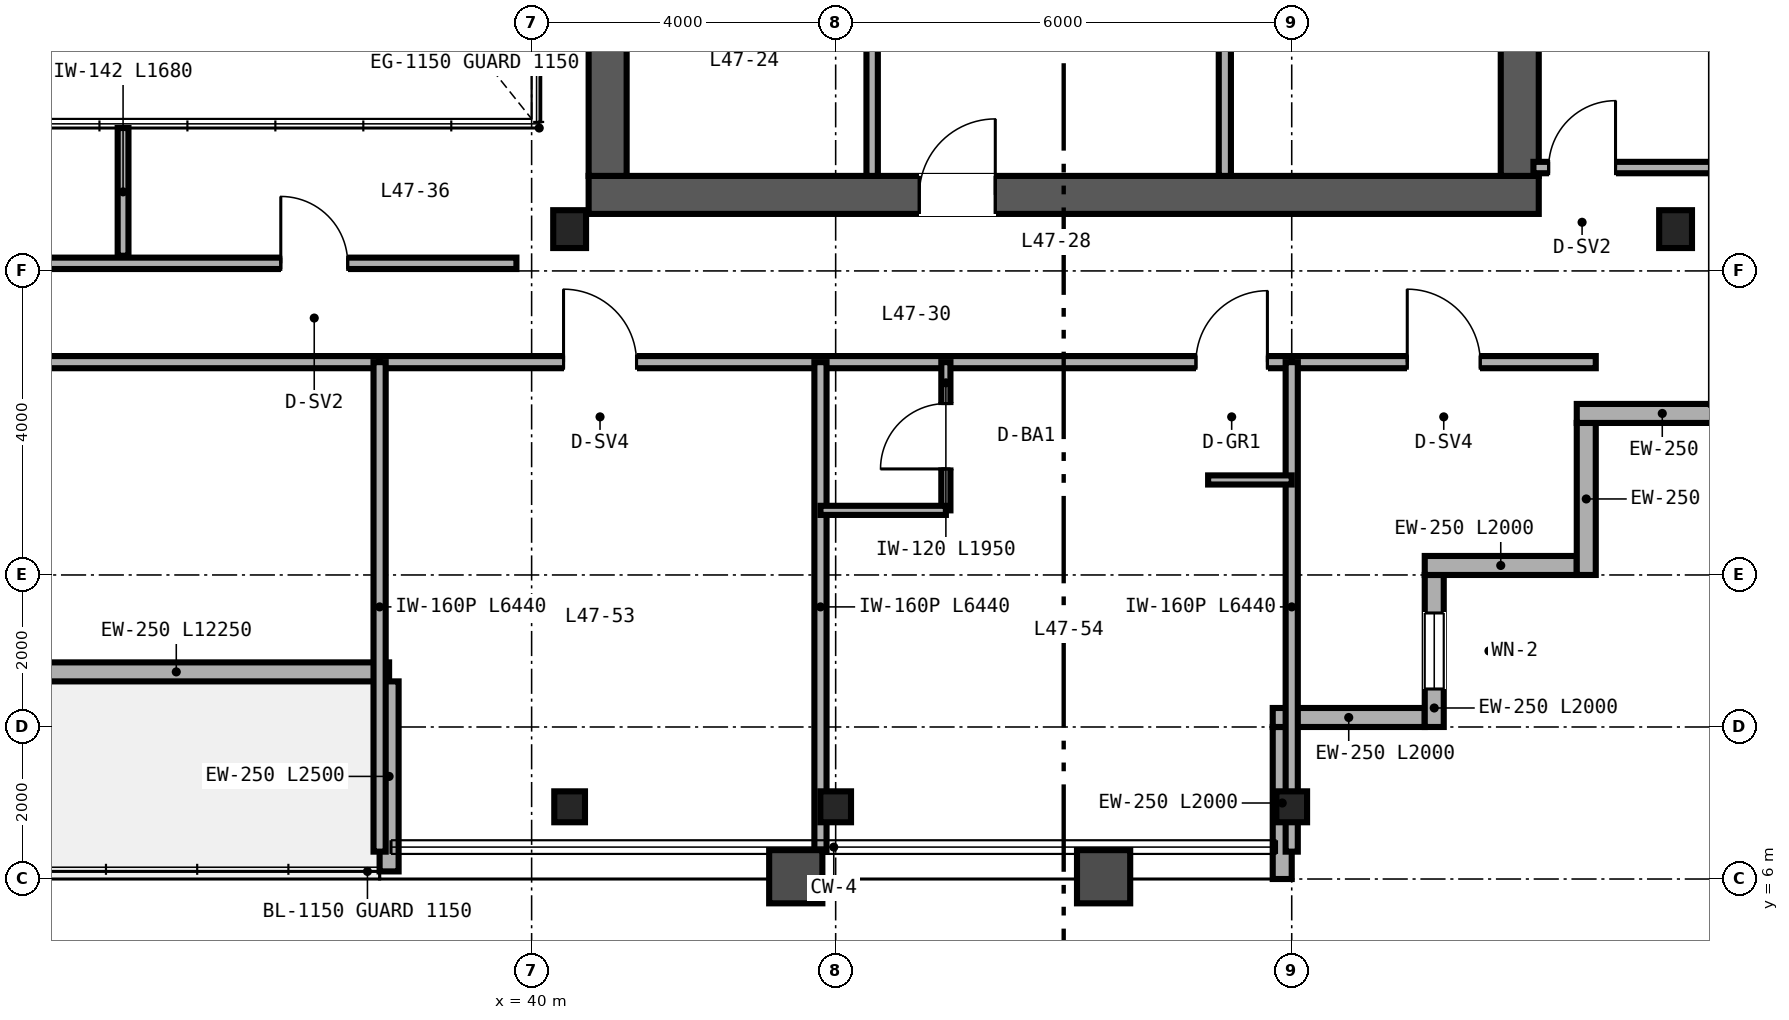
"""IFC4 building model, lengths in metres.
Left out: names, types, materials, properties, quantities, classifications, styles, units other than length and angle.
Written with IfcOpenShell. Run it as: python <this file> out.ifc"""

import sys

from ifc_helpers import new_model, si_unit, direction, frame, frame_2d, origin, origin_2d, place, context, subcontext, project, spatial, rectangle, i_section, extrude, source, transform, mapped, element, fill, save


model = new_model("IFC4")
c1 = context("Model", 3, precision=1e-05, world=origin(), true_north=direction((0.0, 1.0)))
c2 = subcontext(c1, "Body", "Model", "MODEL_VIEW")
j1 = project(units=[si_unit("LENGTHUNIT", "METRE"), si_unit("PLANEANGLEUNIT", "RADIAN")], contexts=[c1])
p1 = place(None, origin())
s1 = spatial("IfcSite", under=j1, at=p1, CompositionType="ELEMENT")
p2 = place(p1, origin())
s2 = spatial("IfcBuilding", under=s1, at=p2, CompositionType="ELEMENT")
p3 = place(p2, frame((0.0, 0.0, 188.4)))
s3 = spatial("IfcBuildingStorey", under=s2, at=p3, CompositionType="ELEMENT", Elevation=188.4)
p4 = place(p3, frame((40.75, 15.0, 0.0), z_axis=(0.0, 0.0, 1.0), x_axis=(1.0, 0.0, 0.0)))
e1 = element("IfcWall", 1, at=p4, inside=s3, PredefinedType="SHEAR", context=c2, shape_type="SweptSolid", body=[
    extrude(rectangle(XDim=12.5, YDim=0.5, at=frame_2d((6.25, 0.0))), origin(), (0.0, 0.0, 1.0), 3.37),
])
p5 = place(p4, frame((4.35, 0.0, 0.0)))
e2 = element("IfcOpeningElement", 2, at=p5, cuts=e1, PredefinedType="OPENING", context=c2, shape_type="SweptSolid", body=[
    extrude(rectangle(XDim=1.0, YDim=2.15, at=frame_2d((0.5, 1.075))), frame((0.0, 0.26, 0.0), z_axis=(0.0, -1.0, 0.0), x_axis=(1.0, 0.0, 0.0)), (0.0, 0.0, 1.0), 0.52),
])
for number, where, z_axis, x_axis in (
    (3, (41.0, 15.25, 0.0), (0.0, 0.0, 1.0), (0.0, 1.0, 0.0)),
    (4, (53.0, 15.25, 0.0), (0.0, 0.0, 1.0), (0.0, 1.0, 0.0)),
):
    element("IfcWall", number, at=place(p3, frame(where, z_axis=z_axis, x_axis=x_axis)), inside=s3, PredefinedType="SHEAR", context=c2, shape_type="SweptSolid", body=[
        extrude(rectangle(XDim=21.5, YDim=0.5, at=frame_2d((10.75, 0.0))), origin(), (0.0, 0.0, 1.0), 3.37),
    ])
m1 = source(origin(), c2, "Body", "SweptSolid", [
    extrude(i_section(OverallWidth=0.432, OverallDepth=0.498, WebThickness=0.056, FlangeThickness=0.089, FilletRadius=0.025, at=origin_2d()), origin(), (0.0, 0.0, 1.0), 3.37),
])
for number, where, z_axis, x_axis in (
    (5, (40.5, 14.55, 0.0), (0.0, 0.0, 1.0), (1.0, 0.0, 0.0)),
    (6, (55.05, 14.55, 0.0), (0.0, 0.0, 1.0), (1.0, 0.0, 0.0)),
):
    element("IfcColumn", number, at=place(p3, frame(where, z_axis=z_axis, x_axis=x_axis)), inside=s3, PredefinedType="COLUMN", context=c2, shape_type="MappedRepresentation", body=[
        mapped(m1, transform((0.0, 0.0, 0.0), scale=1.0)),
    ])
m2 = source(origin(), c2, "Body", "SweptSolid", [
    extrude(i_section(OverallWidth=0.404, OverallDepth=0.407, WebThickness=0.027, FlangeThickness=0.044, FilletRadius=0.025, at=origin_2d()), origin(), (0.0, 0.0, 1.0), 3.37),
])
for number, where, z_axis, x_axis in (
    (7, (40.5, 6.95, 0.0), (0.0, 0.0, 1.0), (1.0, 0.0, 0.0)),
    (8, (44.0, 6.95, 0.0), (0.0, 0.0, 1.0), (1.0, 0.0, 0.0)),
    (9, (50.0, 6.95, 0.0), (0.0, 0.0, 1.0), (1.0, 0.0, 0.0)),
):
    element("IfcColumn", number, at=place(p3, frame(where, z_axis=z_axis, x_axis=x_axis)), inside=s3, PredefinedType="COLUMN", context=c2, shape_type="MappedRepresentation", body=[
        mapped(m2, transform((0.0, 0.0, 0.0), scale=1.0)),
    ])
p6 = place(p3, frame((49.875, 6.0, 0.0), z_axis=(0.0, 0.0, 1.0), x_axis=(0.0, 1.0, 0.0)))
e10 = element("IfcWall", 10, at=p6, inside=s3, PredefinedType="SOLIDWALL", context=c2, shape_type="SweptSolid", body=[
    extrude(rectangle(XDim=2.0, YDim=0.25, at=frame_2d((1.0, 0.0))), origin(), (0.0, 0.0, 1.0), 2.677),
])
p7 = place(p3, frame((49.75, 8.125, 0.0), z_axis=(0.0, 0.0, 1.0), x_axis=(1.0, 0.0, 0.0)))
e11 = element("IfcWall", 11, at=p7, inside=s3, PredefinedType="SOLIDWALL", context=c2, shape_type="SweptSolid", body=[
    extrude(rectangle(XDim=2.0, YDim=0.25, at=frame_2d((1.0, 0.0))), origin(), (0.0, 0.0, 1.0), 3.37),
])
p8 = place(p3, frame((51.875, 8.0, 0.0), z_axis=(0.0, 0.0, 1.0), x_axis=(0.0, 1.0, 0.0)))
e12 = element("IfcWall", 12, at=p8, inside=s3, PredefinedType="SOLIDWALL", context=c2, shape_type="SweptSolid", body=[
    extrude(rectangle(XDim=2.0, YDim=0.25, at=frame_2d((1.0, 0.0))), origin(), (0.0, 0.0, 1.0), 3.37),
])
p9 = place(p8, frame((0.5, 0.0, 0.85)))
e13 = element("IfcOpeningElement", 13, at=p9, cuts=e12, PredefinedType="OPENING", context=c2, shape_type="SweptSolid", body=[
    extrude(rectangle(XDim=1.0, YDim=1.9, at=frame_2d((0.5, 0.95))), frame((0.0, 0.135, 0.0), z_axis=(0.0, -1.0, 0.0), x_axis=(1.0, 0.0, 0.0)), (0.0, 0.0, 1.0), 0.27),
])
for number, where, z_axis, x_axis in (
    (14, (51.75, 10.125, 0.0), (0.0, 0.0, 1.0), (1.0, 0.0, 0.0)),
    (15, (53.875, 10.0, 0.0), (0.0, 0.0, 1.0), (0.0, 1.0, 0.0)),
):
    element("IfcWall", number, at=place(p3, frame(where, z_axis=z_axis, x_axis=x_axis)), inside=s3, PredefinedType="SOLIDWALL", context=c2, shape_type="SweptSolid", body=[
        extrude(rectangle(XDim=2.0, YDim=0.25, at=frame_2d((1.0, 0.0))), origin(), (0.0, 0.0, 1.0), 3.37),
    ])
p10 = place(p3, frame((53.75, 12.125, 0.0), z_axis=(0.0, 0.0, 1.0), x_axis=(1.0, 0.0, 0.0)))
e16 = element("IfcWall", 16, at=p10, inside=s3, PredefinedType="SOLIDWALL", context=c2, shape_type="SweptSolid", body=[
    extrude(rectangle(XDim=2.25, YDim=0.25, at=frame_2d((1.125, 0.0))), origin(), (0.0, 0.0, 1.0), 3.37),
])
p11 = place(p3, frame((25.875, 8.725, 0.0), z_axis=(0.0, 0.0, 1.0), x_axis=(1.0, 0.0, 0.0)))
e17 = element("IfcWall", 17, at=p11, inside=s3, PredefinedType="SOLIDWALL", context=c2, shape_type="SweptSolid", body=[
    extrude(rectangle(XDim=12.25, YDim=0.25, at=frame_2d((6.125, 0.0))), origin(), (0.0, 0.0, 1.0), 3.37),
])
p12 = place(p11, frame((5.6, 0.0, 0.0)))
e18 = element("IfcOpeningElement", 18, at=p12, cuts=e17, PredefinedType="OPENING", context=c2, shape_type="SweptSolid", body=[
    extrude(rectangle(XDim=1.05, YDim=2.15, at=frame_2d((0.525, 1.075))), frame((0.0, 0.135, 0.0), z_axis=(0.0, -1.0, 0.0), x_axis=(1.0, 0.0, 0.0)), (0.0, 0.0, 1.0), 0.27),
])
p13 = place(p3, frame((38.125, 6.1, 0.0), z_axis=(0.0, 0.0, 1.0), x_axis=(0.0, 1.0, 0.0)))
e19 = element("IfcWall", 19, at=p13, inside=s3, PredefinedType="SOLIDWALL", context=c2, shape_type="SweptSolid", body=[
    extrude(rectangle(XDim=2.5, YDim=0.25, at=frame_2d((1.25, 0.0))), origin(), (0.0, 0.0, 1.0), 2.443),
])
p14 = place(p3, frame((49.12, 15.25, 0.0), z_axis=(0.0, 0.0, 1.0), x_axis=(0.0, 1.0, 0.0)))
e20 = element("IfcWall", 20, at=p14, inside=s3, PredefinedType="PARTITIONING", context=c2, shape_type="SweptSolid", body=[
    extrude(rectangle(XDim=16.13, YDim=0.16, at=frame_2d((8.065, 0.0))), origin(), (0.0, 0.0, 1.0), 2.443),
])
p15 = place(p14, frame((2.2, 0.0, 0.0)))
e21 = element("IfcOpeningElement", 21, at=p15, cuts=e20, PredefinedType="OPENING", context=c2, shape_type="SweptSolid", body=[
    extrude(rectangle(XDim=0.9, YDim=2.15, at=frame_2d((0.45, 1.075))), frame((0.0, 0.09, 0.0), z_axis=(0.0, -1.0, 0.0), x_axis=(1.0, 0.0, 0.0)), (0.0, 0.0, 1.0), 0.18),
])
p16 = place(p14, frame((8.2, 0.0, 0.0)))
e22 = element("IfcOpeningElement", 22, at=p16, cuts=e20, PredefinedType="OPENING", context=c2, shape_type="SweptSolid", body=[
    extrude(rectangle(XDim=0.9, YDim=2.15, at=frame_2d((0.45, 1.075))), frame((0.0, 0.09, 0.0), z_axis=(0.0, -1.0, 0.0), x_axis=(1.0, 0.0, 0.0)), (0.0, 0.0, 1.0), 0.18),
])
p17 = place(p14, frame((13.5, 0.0, 0.0)))
e23 = element("IfcOpeningElement", 23, at=p17, cuts=e20, PredefinedType="OPENING", context=c2, shape_type="SweptSolid", body=[
    extrude(rectangle(XDim=0.9, YDim=2.15, at=frame_2d((0.45, 1.075))), frame((0.0, 0.09, 0.0), z_axis=(0.0, -1.0, 0.0), x_axis=(1.0, 0.0, 0.0)), (0.0, 0.0, 1.0), 0.18),
])
p18 = place(p3, frame((44.48, 15.25, 0.0), z_axis=(0.0, 0.0, 1.0), x_axis=(0.0, 1.0, 0.0)))
e24 = element("IfcWall", 24, at=p18, inside=s3, PredefinedType="PARTITIONING", context=c2, shape_type="SweptSolid", body=[
    extrude(rectangle(XDim=11.63, YDim=0.15, at=frame_2d((5.815, 0.0))), origin(), (0.0, 0.0, 1.0), 3.37),
])
p19 = place(p18, frame((2.2, 0.0, 0.0)))
e25 = element("IfcOpeningElement", 25, at=p19, cuts=e24, PredefinedType="OPENING", context=c2, shape_type="SweptSolid", body=[
    extrude(rectangle(XDim=0.9, YDim=2.15, at=frame_2d((0.45, 1.075))), frame((0.0, 0.085, 0.0), z_axis=(0.0, -1.0, 0.0), x_axis=(1.0, 0.0, 0.0)), (0.0, 0.0, 1.0), 0.17),
])
p20 = place(p18, frame((7.87, 0.0, 0.0)))
e26 = element("IfcOpeningElement", 26, at=p20, cuts=e24, PredefinedType="OPENING", context=c2, shape_type="SweptSolid", body=[
    extrude(rectangle(XDim=0.9, YDim=2.15, at=frame_2d((0.45, 1.075))), frame((0.0, 0.085, 0.0), z_axis=(0.0, -1.0, 0.0), x_axis=(1.0, 0.0, 0.0)), (0.0, 0.0, 1.0), 0.17),
])
p21 = place(p3, frame((24.2, 14.1, 0.0), z_axis=(0.0, 0.0, 1.0), x_axis=(1.0, 0.0, 0.0)))
e27 = element("IfcWall", 27, at=p21, inside=s3, PredefinedType="PARTITIONING", context=c2, shape_type="SweptSolid", body=[
    extrude(rectangle(XDim=15.6, YDim=0.15, at=frame_2d((7.8, 0.0))), origin(), (0.0, 0.0, 1.0), 3.37),
])
p22 = place(p21, frame((2.0, 0.0, 0.0)))
e28 = element("IfcOpeningElement", 28, at=p22, cuts=e27, PredefinedType="OPENING", context=c2, shape_type="SweptSolid", body=[
    extrude(rectangle(XDim=0.88, YDim=2.15, at=frame_2d((0.44, 1.075))), frame((0.0, 0.085, 0.0), z_axis=(0.0, -1.0, 0.0), x_axis=(1.0, 0.0, 0.0)), (0.0, 0.0, 1.0), 0.17),
])
p23 = place(p21, frame((7.25, 0.0, 0.0)))
e29 = element("IfcOpeningElement", 29, at=p23, cuts=e27, PredefinedType="OPENING", context=c2, shape_type="SweptSolid", body=[
    extrude(rectangle(XDim=0.88, YDim=2.15, at=frame_2d((0.44, 1.075))), frame((0.0, 0.085, 0.0), z_axis=(0.0, -1.0, 0.0), x_axis=(1.0, 0.0, 0.0)), (0.0, 0.0, 1.0), 0.17),
])
p24 = place(p21, frame((12.5, 0.0, 0.0)))
e30 = element("IfcOpeningElement", 30, at=p24, cuts=e27, PredefinedType="OPENING", context=c2, shape_type="SweptSolid", body=[
    extrude(rectangle(XDim=0.88, YDim=2.15, at=frame_2d((0.44, 1.075))), frame((0.0, 0.085, 0.0), z_axis=(0.0, -1.0, 0.0), x_axis=(1.0, 0.0, 0.0)), (0.0, 0.0, 1.0), 0.17),
])
p25 = place(p3, frame((34.625, 14.2, 0.0), z_axis=(0.0, 0.0, 1.0), x_axis=(0.0, 1.0, 0.0)))
e31 = element("IfcWall", 31, at=p25, inside=s3, PredefinedType="PARTITIONING", context=c2, shape_type="SweptSolid", body=[
    extrude(rectangle(XDim=1.68, YDim=0.142, at=frame_2d((0.84, 0.0))), origin(), (0.0, 0.0, 1.0), 3.37),
])
p26 = place(p3, frame((53.18, 15.36, 0.0), z_axis=(0.0, 0.0, 1.0), x_axis=(1.0, 0.0, 0.0)))
e32 = element("IfcWall", 32, at=p26, inside=s3, PredefinedType="PARTITIONING", context=c2, shape_type="SweptSolid", body=[
    extrude(rectangle(XDim=2.66, YDim=0.15, at=frame_2d((1.33, 0.0))), origin(), (0.0, 0.0, 1.0), 2.591),
])
p27 = place(p26, frame((0.2, 0.0, 0.0)))
e33 = element("IfcOpeningElement", 33, at=p27, cuts=e32, PredefinedType="OPENING", context=c2, shape_type="SweptSolid", body=[
    extrude(rectangle(XDim=0.88, YDim=2.15, at=frame_2d((0.44, 1.075))), frame((0.0, 0.085, 0.0), z_axis=(0.0, -1.0, 0.0), x_axis=(1.0, 0.0, 0.0)), (0.0, 0.0, 1.0), 0.17),
])
p28 = place(p3, frame((50.0, 12.8, 0.0), z_axis=(0.0, 0.0, 1.0), x_axis=(1.0, 0.0, 0.0)))
e34 = element("IfcWall", 34, at=p28, inside=s3, PredefinedType="PARTITIONING", context=c2, shape_type="SweptSolid", body=[
    extrude(rectangle(XDim=4.0, YDim=0.16, at=frame_2d((2.0, 0.0))), origin(), (0.0, 0.0, 1.0), 3.37),
])
p29 = place(p28, frame((1.52, 0.0, 0.0)))
e35 = element("IfcOpeningElement", 35, at=p29, cuts=e34, PredefinedType="OPENING", context=c2, shape_type="SweptSolid", body=[
    extrude(rectangle(XDim=0.96, YDim=2.15, at=frame_2d((0.48, 1.075))), frame((0.0, 0.09, 0.0), z_axis=(0.0, -1.0, 0.0), x_axis=(1.0, 0.0, 0.0)), (0.0, 0.0, 1.0), 0.18),
])
p30 = place(p3, frame((26.0, 12.8, 0.0), z_axis=(0.0, 0.0, 1.0), x_axis=(1.0, 0.0, 0.0)))
e36 = element("IfcWall", 36, at=p30, inside=s3, PredefinedType="PARTITIONING", context=c2, shape_type="SweptSolid", body=[
    extrude(rectangle(XDim=12.0, YDim=0.16, at=frame_2d((6.0, 0.0))), origin(), (0.0, 0.0, 1.0), 3.37),
])
p31 = place(p30, frame((5.2, 0.0, 0.0)))
e37 = element("IfcOpeningElement", 37, at=p31, cuts=e36, PredefinedType="OPENING", context=c2, shape_type="SweptSolid", body=[
    extrude(rectangle(XDim=0.96, YDim=2.15, at=frame_2d((0.48, 1.075))), frame((0.0, 0.09, 0.0), z_axis=(0.0, -1.0, 0.0), x_axis=(1.0, 0.0, 0.0)), (0.0, 0.0, 1.0), 0.18),
])
p32 = place(p3, frame((38.0, 12.8, 0.0), z_axis=(0.0, 0.0, 1.0), x_axis=(1.0, 0.0, 0.0)))
e38 = element("IfcWall", 38, at=p32, inside=s3, PredefinedType="PARTITIONING", context=c2, shape_type="SweptSolid", body=[
    extrude(rectangle(XDim=12.0, YDim=0.16, at=frame_2d((6.0, 0.0))), origin(), (0.0, 0.0, 1.0), 2.913),
])
p33 = place(p32, frame((2.42, 0.0, 0.0)))
e39 = element("IfcOpeningElement", 39, at=p33, cuts=e38, PredefinedType="OPENING", context=c2, shape_type="SweptSolid", body=[
    extrude(rectangle(XDim=0.96, YDim=2.15, at=frame_2d((0.48, 1.075))), frame((0.0, 0.09, 0.0), z_axis=(0.0, -1.0, 0.0), x_axis=(1.0, 0.0, 0.0)), (0.0, 0.0, 1.0), 0.18),
])
p34 = place(p32, frame((10.74, 0.0, 0.0)))
e40 = element("IfcOpeningElement", 40, at=p34, cuts=e38, PredefinedType="OPENING", context=c2, shape_type="SweptSolid", body=[
    extrude(rectangle(XDim=0.94, YDim=2.15, at=frame_2d((0.47, 1.075))), frame((0.0, 0.09, 0.0), z_axis=(0.0, -1.0, 0.0), x_axis=(1.0, 0.0, 0.0)), (0.0, 0.0, 1.0), 0.18),
])
p35 = place(p3, frame((38.0, 6.36, 0.0), z_axis=(0.0, 0.0, 1.0), x_axis=(0.0, 1.0, 0.0)))
e41 = element("IfcWall", 41, at=p35, inside=s3, PredefinedType="PARTITIONING", context=c2, shape_type="SweptSolid", body=[
    extrude(rectangle(XDim=6.44, YDim=0.16, at=frame_2d((3.22, 0.0))), origin(), (0.0, 0.0, 1.0), 2.443),
])
for number, where, z_axis, x_axis in (
    (42, (50.0, 6.36, 0.0), (0.0, 0.0, 1.0), (0.0, 1.0, 0.0)),
    (43, (43.8, 6.36, 0.0), (0.0, 0.0, 1.0), (0.0, 1.0, 0.0)),
):
    element("IfcWall", number, at=place(p3, frame(where, z_axis=z_axis, x_axis=x_axis)), inside=s3, PredefinedType="PARTITIONING", context=c2, shape_type="SweptSolid", body=[
        extrude(rectangle(XDim=6.44, YDim=0.16, at=frame_2d((3.22, 0.0))), origin(), (0.0, 0.0, 1.0), 2.677),
    ])
p36 = place(p3, frame((45.45, 10.85, 0.0), z_axis=(0.0, 0.0, 1.0), x_axis=(0.0, 1.0, 0.0)))
e44 = element("IfcWall", 44, at=p36, inside=s3, PredefinedType="PARTITIONING", context=c2, shape_type="SweptSolid", body=[
    extrude(rectangle(XDim=1.95, YDim=0.12, at=frame_2d((0.975, 0.0))), origin(), (0.0, 0.0, 1.0), 3.37),
])
p37 = place(p36, frame((0.545, 0.0, 0.0)))
e45 = element("IfcOpeningElement", 45, at=p37, cuts=e44, PredefinedType="OPENING", context=c2, shape_type="SweptSolid", body=[
    extrude(rectangle(XDim=0.86, YDim=2.1, at=frame_2d((0.43, 1.05))), frame((0.0, 0.07, 0.0), z_axis=(0.0, -1.0, 0.0), x_axis=(1.0, 0.0, 0.0)), (0.0, 0.0, 1.0), 0.14),
])
p38 = place(p3, frame((43.8, 10.85, 0.0), z_axis=(0.0, 0.0, 1.0), x_axis=(1.0, 0.0, 0.0)))
e46 = element("IfcWall", 46, at=p38, inside=s3, PredefinedType="PARTITIONING", context=c2, shape_type="SweptSolid", body=[
    extrude(rectangle(XDim=1.65, YDim=0.12, at=frame_2d((0.825, 0.0))), origin(), (0.0, 0.0, 1.0), 3.37),
])
p39 = place(p3, frame((48.9, 11.25, 0.0), z_axis=(0.0, 0.0, 1.0), x_axis=(1.0, 0.0, 0.0)))
e47 = element("IfcWall", 47, at=p39, inside=s3, PredefinedType="PARTITIONING", context=c2, shape_type="SweptSolid", body=[
    extrude(rectangle(XDim=1.1, YDim=0.12, at=frame_2d((0.55, 0.0))), origin(), (0.0, 0.0, 1.0), 3.37),
])
m3 = source(origin(), c2, "Body", "SweptSolid", [
    extrude(rectangle(XDim=1.0, YDim=1.9, at=frame_2d((0.5, 0.95))), frame((0.0, 0.03, 0.0), z_axis=(0.0, -1.0, 0.0), x_axis=(1.0, 0.0, 0.0)), (0.0, 0.0, 1.0), 0.06),
])
p40 = place(p9, origin())
e48 = element("IfcWindow", 48, at=p40, inside=s3, PartitioningType="SINGLE_PANEL", PredefinedType="WINDOW", context=c2, shape_type="MappedRepresentation", body=[
    mapped(m3, transform((0.0, 0.0, 0.0), scale=1.0)),
])
fill(e13, e48)
m4 = source(origin(), c2, "Body", "SweptSolid", [
    extrude(rectangle(XDim=1.0, YDim=2.15, at=frame_2d((0.5, 1.075))), frame((0.0, 0.025, 0.0), z_axis=(0.0, -1.0, 0.0), x_axis=(1.0, 0.0, 0.0)), (0.0, 0.0, 1.0), 0.05),
])
p41 = place(p5, origin())
e49 = element("IfcDoor", 49, at=p41, inside=s3, OperationType="SINGLE_SWING_RIGHT", PredefinedType="DOOR", context=c2, shape_type="MappedRepresentation", body=[
    mapped(m4, transform((0.0, 0.0, 0.0), scale=1.0)),
])
fill(e2, e49)
m5 = source(origin(), c2, "Body", "SweptSolid", [
    extrude(rectangle(XDim=0.88, YDim=2.15, at=frame_2d((0.44, 1.075))), frame((0.0, 0.025, 0.0), z_axis=(0.0, -1.0, 0.0), x_axis=(1.0, 0.0, 0.0)), (0.0, 0.0, 1.0), 0.05),
])
p42 = place(p24, origin())
e50 = element("IfcDoor", 50, at=p42, inside=s3, OperationType="SINGLE_SWING_LEFT", PredefinedType="DOOR", context=c2, shape_type="MappedRepresentation", body=[
    mapped(m5, transform((0.0, 0.0, 0.0), scale=1.0)),
])
fill(e30, e50)
p43 = place(p27, origin())
e51 = element("IfcDoor", 51, at=p43, inside=s3, OperationType="SINGLE_SWING_RIGHT", PredefinedType="DOOR", context=c2, shape_type="MappedRepresentation", body=[
    mapped(m5, transform((0.0, 0.0, 0.0), scale=1.0)),
])
fill(e33, e51)
m6 = source(origin(), c2, "Body", "SweptSolid", [
    extrude(rectangle(XDim=0.96, YDim=2.15, at=frame_2d((0.48, 1.075))), frame((0.0, 0.025, 0.0), z_axis=(0.0, -1.0, 0.0), x_axis=(1.0, 0.0, 0.0)), (0.0, 0.0, 1.0), 0.05),
])
p44 = place(p29, origin())
e52 = element("IfcDoor", 52, at=p44, inside=s3, OperationType="SINGLE_SWING_LEFT", PredefinedType="DOOR", context=c2, shape_type="MappedRepresentation", body=[
    mapped(m6, transform((0.0, 0.0, 0.0), scale=1.0)),
])
fill(e35, e52)
m7 = source(origin(), c2, "Body", "SweptSolid", [
    extrude(rectangle(XDim=0.86, YDim=2.1, at=frame_2d((0.43, 1.05))), frame((0.0, 0.025, 0.0), z_axis=(0.0, -1.0, 0.0), x_axis=(1.0, 0.0, 0.0)), (0.0, 0.0, 1.0), 0.05),
])
p45 = place(p37, origin())
e53 = element("IfcDoor", 53, at=p45, inside=s3, OperationType="SINGLE_SWING_LEFT", PredefinedType="DOOR", context=c2, shape_type="MappedRepresentation", body=[
    mapped(m7, transform((0.0, 0.0, 0.0), scale=1.0)),
])
fill(e45, e53)
p46 = place(p33, origin())
e54 = element("IfcDoor", 54, at=p46, inside=s3, OperationType="SINGLE_SWING_LEFT", PredefinedType="DOOR", context=c2, shape_type="MappedRepresentation", body=[
    mapped(m6, transform((0.0, 0.0, 0.0), scale=1.0)),
])
fill(e39, e54)
m8 = source(origin(), c2, "Body", "SweptSolid", [
    extrude(rectangle(XDim=0.94, YDim=2.15, at=frame_2d((0.47, 1.075))), frame((0.0, 0.025, 0.0), z_axis=(0.0, -1.0, 0.0), x_axis=(1.0, 0.0, 0.0)), (0.0, 0.0, 1.0), 0.05),
])
p47 = place(p34, origin())
e55 = element("IfcDoor", 55, at=p47, inside=s3, OperationType="SINGLE_SWING_RIGHT", PredefinedType="DOOR", context=c2, shape_type="MappedRepresentation", body=[
    mapped(m8, transform((0.0, 0.0, 0.0), scale=1.0)),
])
fill(e40, e55)
save(model, sys.argv[1])
